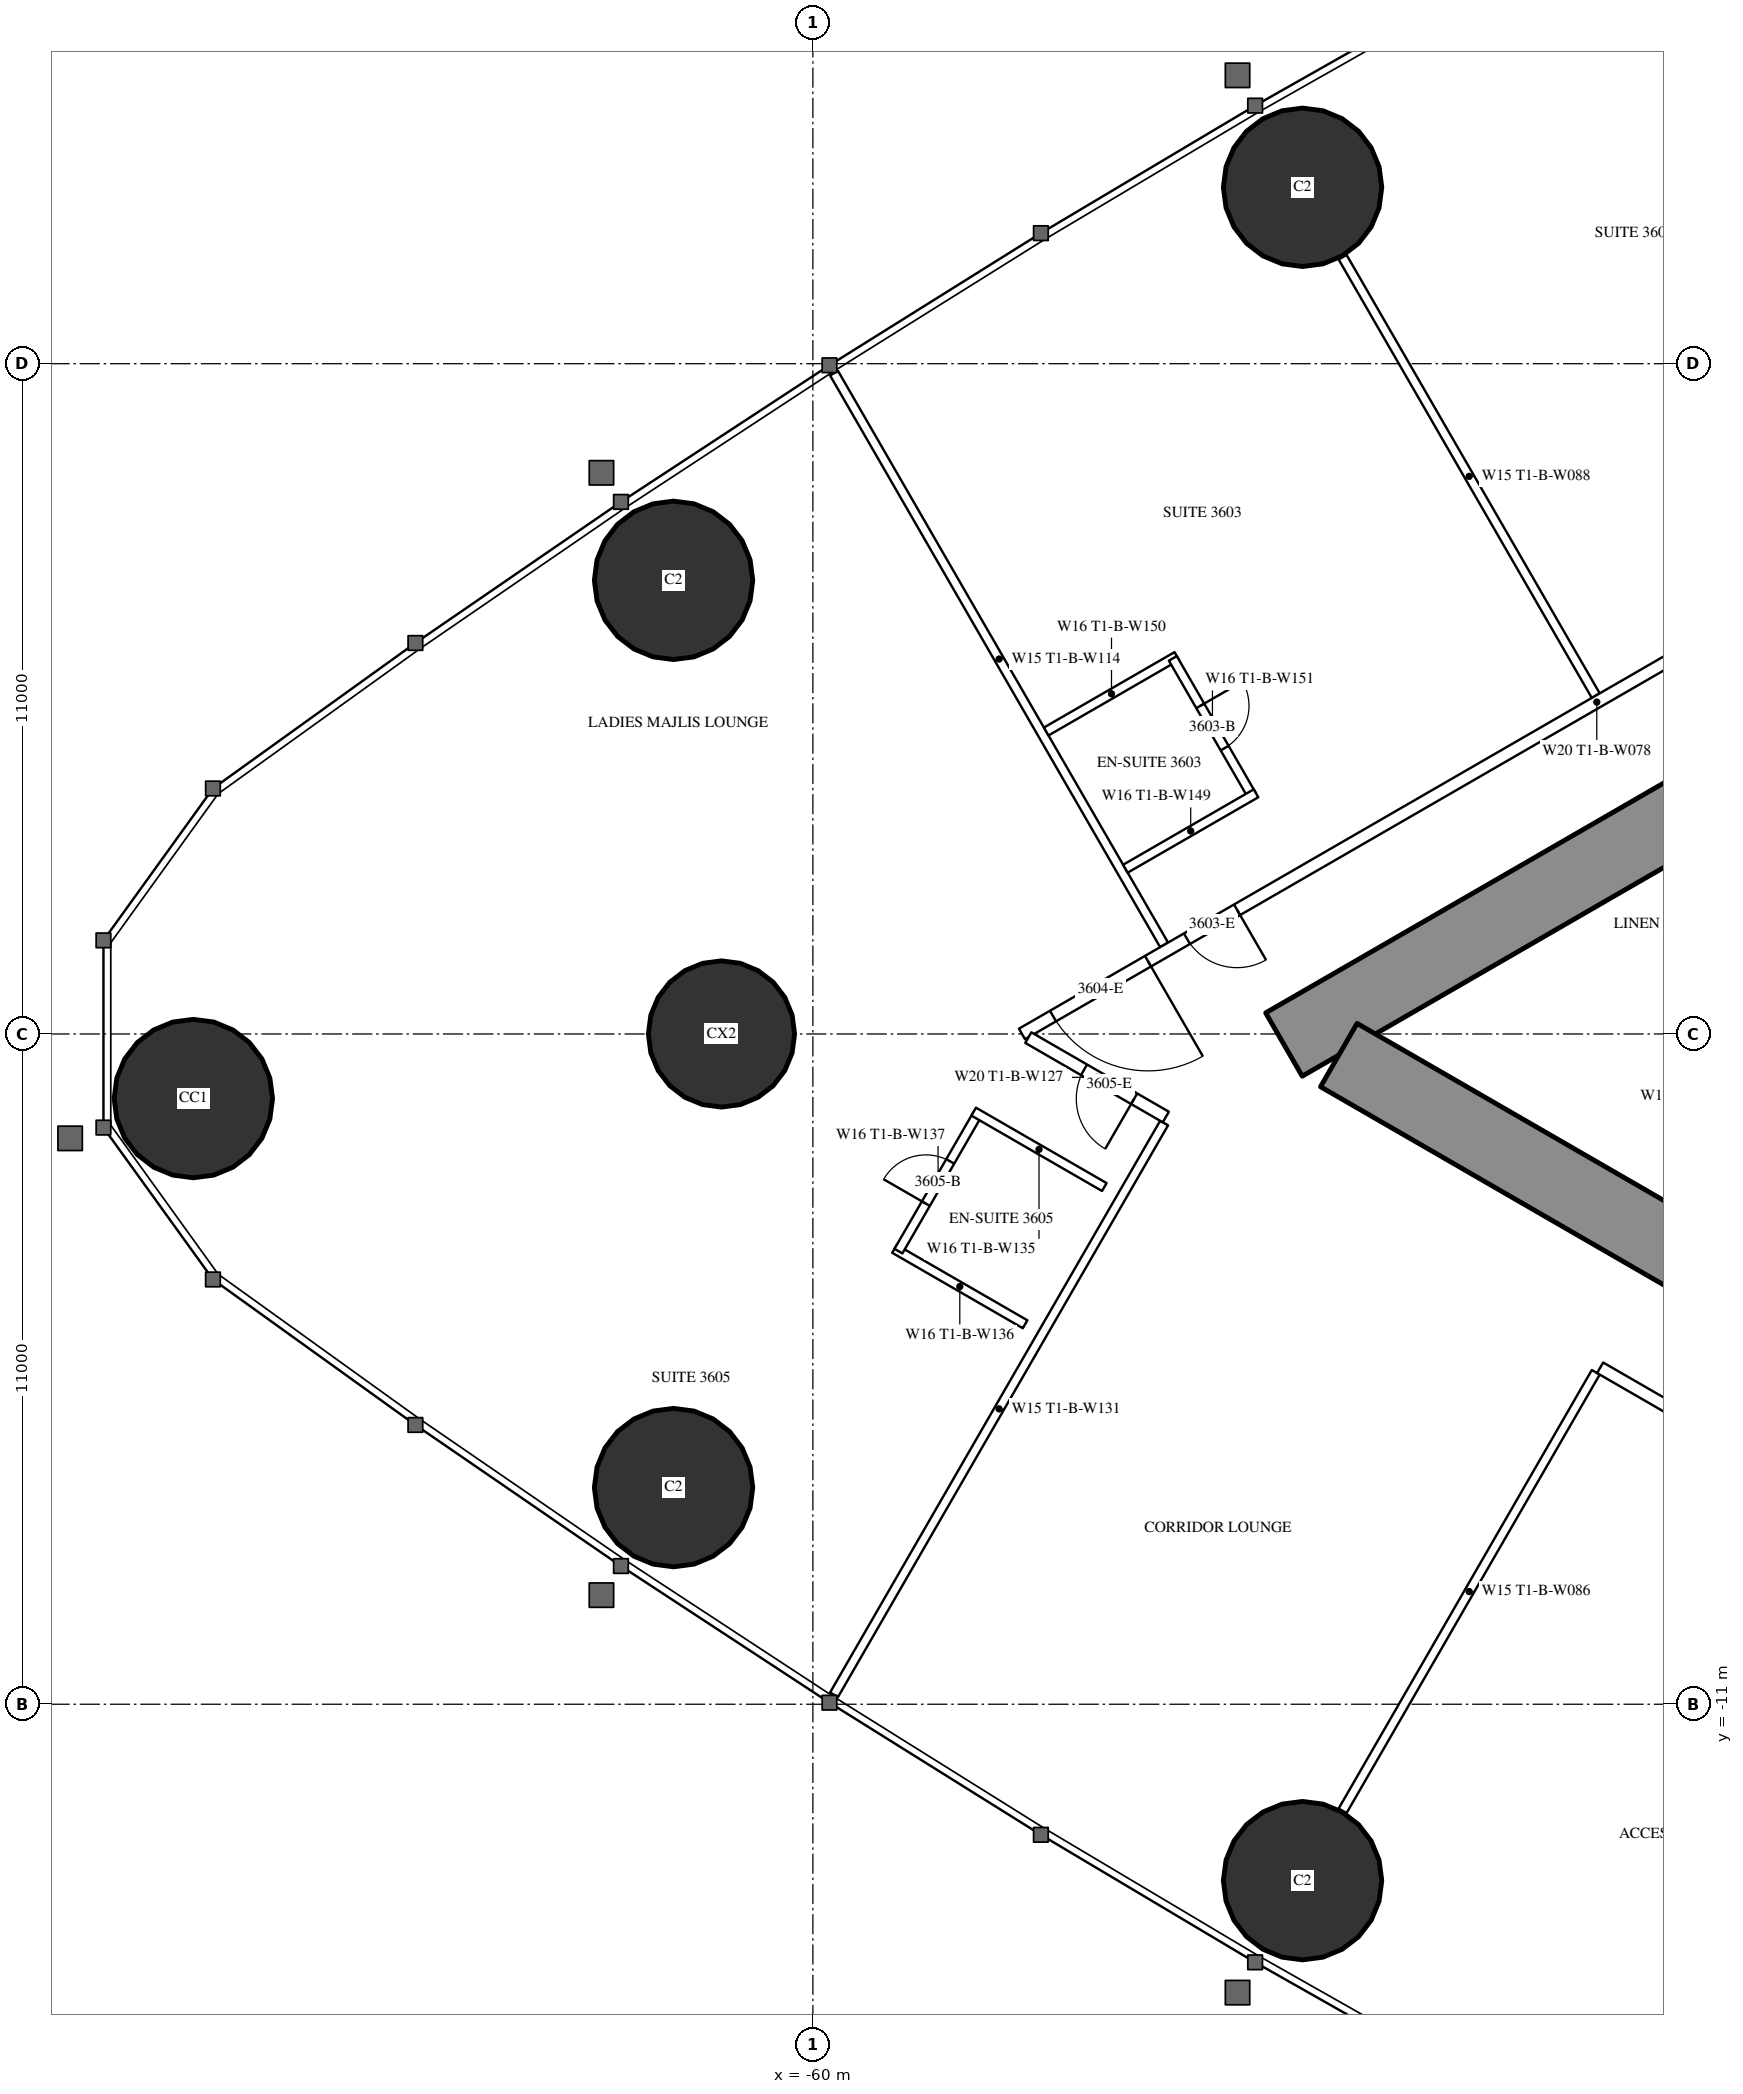
"""IFC4 building model, lengths in metres.
Left out: names, types, materials, properties, quantities, classifications, styles, units other than length and angle.
Written with IfcOpenShell. Run it as: python <this file> out.ifc"""

import sys

from ifc_helpers import new_model, si_unit, direction, frame, frame_2d, origin, origin_2d, place, context, subcontext, project, spatial, rectangle, circle, hollow_circle, extrude, element, fill, save


model = new_model("IFC4")
c1 = context("Model", 3, precision=1e-05, world=origin(), true_north=direction((0.0, 1.0)))
c2 = subcontext(c1, "Body", "Model", "MODEL_VIEW")
j1 = project(units=[si_unit("LENGTHUNIT", "METRE"), si_unit("PLANEANGLEUNIT", "RADIAN")], contexts=[c1])
p1 = place(None, origin())
s1 = spatial("IfcSite", under=j1, at=p1, CompositionType="ELEMENT")
p2 = place(p1, origin())
s2 = spatial("IfcBuilding", under=s1, at=p2, CompositionType="ELEMENT")
p3 = place(p2, frame((0.0, 0.0, 136.1)))
s3 = spatial("IfcBuildingStorey", under=s2, at=p3, CompositionType="ELEMENT", Elevation=136.1)
for number, where, z_axis, x_axis in (
    (1, (-70.168, -1.06, 0.0), (0.0, 0.0, 1.0), (1.0, 0.0, 0.0)),
    (2, (-62.287, -7.445, 0.0), (0.0, 0.0, 1.0), (1.0, 0.0, 0.0)),
    (3, (-51.963, -13.895, 0.0), (0.0, 0.0, 1.0), (1.0, 0.0, 0.0)),
    (4, (-51.963, 13.895, 0.0), (0.0, 0.0, 1.0), (1.0, 0.0, 0.0)),
    (5, (-62.287, 7.445, 0.0), (0.0, 0.0, 1.0), (1.0, 0.0, 0.0)),
):
    element("IfcColumn", number, at=place(p3, frame(where, z_axis=z_axis, x_axis=x_axis)), inside=s3, PredefinedType="COLUMN", context=c2, shape_type="SweptSolid", body=[
        extrude(hollow_circle(Radius=1.3, WallThickness=0.1, at=origin_2d()), origin(), (0.0, 0.0, 1.0), 3.5),
    ])
p4 = place(p3, frame((-61.5, 0.0, 0.0), z_axis=(0.0, 0.0, 1.0), x_axis=(1.0, 0.0, 0.0)))
e6 = element("IfcColumn", 6, at=p4, inside=s3, PredefinedType="COLUMN", context=c2, shape_type="SweptSolid", body=[
    extrude(circle(Radius=1.2, at=origin_2d()), origin(), (0.0, 0.0, 1.0), 3.5),
])
p5 = place(p3, frame((-27.2, 14.3, 0.0), z_axis=(0.0, 0.0, 1.0), x_axis=(-0.866026593062, -0.499997940104, 0.0)))
e7 = element("IfcWall", 7, at=p5, inside=s3, PredefinedType="SHEAR", context=c2, shape_type="SweptSolid", body=[
    extrude(rectangle(XDim=28.946, YDim=1.2, at=frame_2d((14.473, 0.0))), origin(), (0.0, 0.0, 1.0), 3.5),
])
p6 = place(p5, frame((4.6, 0.0, 0.0)))
e8 = element("IfcOpeningElement", 8, at=p6, cuts=e7, PredefinedType="OPENING", context=c2, shape_type="SweptSolid", body=[
    extrude(rectangle(XDim=1.0, YDim=2.2, at=frame_2d((0.5, 1.1))), frame((0.0, 0.61, 0.0), z_axis=(0.0, -1.0, 0.0), x_axis=(1.0, 0.0, 0.0)), (0.0, 0.0, 1.0), 1.22),
])
p7 = place(p5, frame((13.395, 0.0, 0.0)))
e9 = element("IfcOpeningElement", 9, at=p7, cuts=e7, PredefinedType="OPENING", context=c2, shape_type="SweptSolid", body=[
    extrude(rectangle(XDim=1.8, YDim=2.2, at=frame_2d((0.9, 1.1))), frame((0.0, 0.61, 0.0), z_axis=(0.0, -1.0, 0.0), x_axis=(1.0, 0.0, 0.0)), (0.0, 0.0, 1.0), 1.22),
])
p8 = place(p3, frame((-27.2, -14.3, 0.0), z_axis=(0.0, 0.0, 1.0), x_axis=(-0.866024021859, 0.500002393557, 0.0)))
e10 = element("IfcWall", 10, at=p8, inside=s3, PredefinedType="SHEAR", context=c2, shape_type="SweptSolid", body=[
    extrude(rectangle(XDim=27.907, YDim=1.2, at=frame_2d((13.954, 0.0))), origin(), (0.0, 0.0, 1.0), 3.5),
])
p9 = place(p8, frame((4.6, 0.0, 0.0)))
e11 = element("IfcOpeningElement", 11, at=p9, cuts=e10, PredefinedType="OPENING", context=c2, shape_type="SweptSolid", body=[
    extrude(rectangle(XDim=1.0, YDim=2.2, at=frame_2d((0.5, 1.1))), frame((0.0, 0.61, 0.0), z_axis=(0.0, -1.0, 0.0), x_axis=(1.0, 0.0, 0.0)), (0.0, 0.0, 1.0), 1.22),
])
p10 = place(p8, frame((13.395, 0.0, 0.0)))
e12 = element("IfcOpeningElement", 12, at=p10, cuts=e10, PredefinedType="OPENING", context=c2, shape_type="SweptSolid", body=[
    extrude(rectangle(XDim=1.8, YDim=2.2, at=frame_2d((0.9, 1.1))), frame((0.0, 0.61, 0.0), z_axis=(0.0, -1.0, 0.0), x_axis=(1.0, 0.0, 0.0)), (0.0, 0.0, 1.0), 1.22),
])
p11 = place(p3, frame((-47.151, 5.552, 0.0), z_axis=(0.0, 0.0, 1.0), x_axis=(-0.500003012045, 0.866023664773, 0.0)))
e13 = element("IfcWall", 13, at=p11, inside=s3, PredefinedType="PARTITIONING", context=c2, shape_type="SweptSolid", body=[
    extrude(rectangle(XDim=8.311, YDim=0.15, at=frame_2d((4.156, 0.0))), origin(), (0.0, 0.0, 1.0), 2.2),
])
p12 = place(p3, frame((-54.236, 1.462, 0.0), z_axis=(0.0, 0.0, 1.0), x_axis=(-0.499990351854, 0.866030974073, 0.0)))
e14 = element("IfcWall", 14, at=p12, inside=s3, PredefinedType="PARTITIONING", context=c2, shape_type="SweptSolid", body=[
    extrude(rectangle(XDim=10.834, YDim=0.15, at=frame_2d((5.417, 0.0))), origin(), (0.0, 0.0, 1.0), 3.25),
])
p13 = place(p3, frame((-47.151, -5.552, 0.0), z_axis=(0.0, 0.0, 1.0), x_axis=(-0.500003012045, -0.866023664773, 0.0)))
e15 = element("IfcWall", 15, at=p13, inside=s3, PredefinedType="PARTITIONING", context=c2, shape_type="SweptSolid", body=[
    extrude(rectangle(XDim=8.311, YDim=0.15, at=frame_2d((4.156, 0.0))), origin(), (0.0, 0.0, 1.0), 2.2),
])
p14 = place(p3, frame((-54.236, -1.462, 0.0), z_axis=(0.0, 0.0, 1.0), x_axis=(-0.499990351854, -0.866030974073, 0.0)))
e16 = element("IfcWall", 16, at=p14, inside=s3, PredefinedType="PARTITIONING", context=c2, shape_type="SweptSolid", body=[
    extrude(rectangle(XDim=10.834, YDim=0.15, at=frame_2d((5.417, 0.0))), origin(), (0.0, 0.0, 1.0), 3.25),
])
p15 = place(p3, frame((-37.7, 10.894, 0.0), z_axis=(0.0, 0.0, 1.0), x_axis=(-0.866027905338, -0.499995667157, 0.0)))
e17 = element("IfcWall", 17, at=p15, inside=s3, PredefinedType="PARTITIONING", context=c2, shape_type="SweptSolid", body=[
    extrude(rectangle(XDim=21.787, YDim=0.2, at=frame_2d((10.894, 0.0))), origin(), (0.0, 0.0, 1.0), 3.25),
])
p16 = place(p15, frame((17.711, 0.0, 0.0)))
e18 = element("IfcOpeningElement", 18, at=p16, cuts=e17, PredefinedType="OPENING", context=c2, shape_type="SweptSolid", body=[
    extrude(rectangle(XDim=0.95, YDim=2.2, at=frame_2d((0.475, 1.1))), frame((0.0, 0.11, 0.0), z_axis=(0.0, -1.0, 0.0), x_axis=(1.0, 0.0, 0.0)), (0.0, 0.0, 1.0), 0.22),
])
p17 = place(p15, frame((19.399, 0.0, 0.0)))
e19 = element("IfcOpeningElement", 19, at=p17, cuts=e17, PredefinedType="OPENING", context=c2, shape_type="SweptSolid", body=[
    extrude(rectangle(XDim=1.8, YDim=2.2, at=frame_2d((0.9, 1.1))), frame((0.0, 0.11, 0.0), z_axis=(0.0, -1.0, 0.0), x_axis=(1.0, 0.0, 0.0)), (0.0, 0.0, 1.0), 0.22),
])
p18 = place(p15, frame((0.6, 0.0, 0.0)))
e20 = element("IfcOpeningElement", 20, at=p18, cuts=e17, PredefinedType="OPENING", context=c2, shape_type="SweptSolid", body=[
    extrude(rectangle(XDim=0.95, YDim=2.2, at=frame_2d((0.475, 1.1))), frame((0.0, 0.11, 0.0), z_axis=(0.0, -1.0, 0.0), x_axis=(1.0, 0.0, 0.0)), (0.0, 0.0, 1.0), 0.22),
])
p19 = place(p3, frame((-36.92, -11.344, 0.0), z_axis=(0.0, 0.0, 1.0), x_axis=(-0.866027897759, 0.499995680284, 0.0)))
e21 = element("IfcWall", 21, at=p19, inside=s3, PredefinedType="PARTITIONING", context=c2, shape_type="SweptSolid", body=[
    extrude(rectangle(XDim=11.731, YDim=0.2, at=frame_2d((5.865, 0.0))), origin(), (0.0, 0.0, 1.0), 3.25),
])
p20 = place(p19, frame((3.35, 0.0, 0.0)))
e22 = element("IfcOpeningElement", 22, at=p20, cuts=e21, PredefinedType="OPENING", context=c2, shape_type="SweptSolid", body=[
    extrude(rectangle(XDim=1.0, YDim=2.2, at=frame_2d((0.5, 1.1))), frame((0.0, 0.11, 0.0), z_axis=(0.0, -1.0, 0.0), x_axis=(1.0, 0.0, 0.0)), (0.0, 0.0, 1.0), 0.22),
])
p21 = place(p3, frame((-54.207, -1.363, 0.0), z_axis=(0.0, 0.0, 1.0), x_axis=(-0.866049872286, 0.499957616916, 0.0)))
e23 = element("IfcWall", 23, at=p21, inside=s3, PredefinedType="PARTITIONING", context=c2, shape_type="SweptSolid", body=[
    extrude(rectangle(XDim=2.606, YDim=0.2, at=frame_2d((1.303, 0.0))), origin(), (0.0, 0.0, 1.0), 3.25),
])
p22 = place(p21, frame((0.6, 0.0, 0.0)))
e24 = element("IfcOpeningElement", 24, at=p22, cuts=e23, PredefinedType="OPENING", context=c2, shape_type="SweptSolid", body=[
    extrude(rectangle(XDim=0.95, YDim=2.2, at=frame_2d((0.475, 1.1))), frame((0.0, 0.11, 0.0), z_axis=(0.0, -1.0, 0.0), x_axis=(1.0, 0.0, 0.0)), (0.0, 0.0, 1.0), 0.22),
])
p23 = place(p3, frame((-54.027, 6.201, 0.0), z_axis=(0.0, 0.0, 1.0), x_axis=(-0.866006523861, -0.500032699561, 0.0)))
e25 = element("IfcWall", 25, at=p23, inside=s3, PredefinedType="PARTITIONING", context=c2, shape_type="SweptSolid", body=[
    extrude(rectangle(XDim=2.475, YDim=0.15, at=frame_2d((1.237, 0.0))), origin(), (0.0, 0.0, 1.0), 3.25),
])
p24 = place(p3, frame((-52.792, 3.912, 0.0), z_axis=(0.0, 0.0, 1.0), x_axis=(-0.500006934395, 0.866021400173, 0.0)))
e26 = element("IfcWall", 26, at=p24, inside=s3, PredefinedType="PARTITIONING", context=c2, shape_type="SweptSolid", body=[
    extrude(rectangle(XDim=2.6, YDim=0.15, at=frame_2d((1.3, 0.0))), origin(), (0.0, 0.0, 1.0), 3.25),
])
p25 = place(p24, frame((0.9, 0.0, 0.0)))
e27 = element("IfcOpeningElement", 27, at=p25, cuts=e26, PredefinedType="OPENING", context=c2, shape_type="SweptSolid", body=[
    extrude(rectangle(XDim=0.8, YDim=2.2, at=frame_2d((0.4, 1.1))), frame((0.0, 0.085, 0.0), z_axis=(0.0, -1.0, 0.0), x_axis=(1.0, 0.0, 0.0)), (0.0, 0.0, 1.0), 0.17),
])
p26 = place(p3, frame((-52.727, 3.95, 0.0), z_axis=(0.0, 0.0, 1.0), x_axis=(-0.866006523861, -0.500032699561, 0.0)))
e28 = element("IfcWall", 28, at=p26, inside=s3, PredefinedType="PARTITIONING", context=c2, shape_type="SweptSolid", body=[
    extrude(rectangle(XDim=2.475, YDim=0.15, at=frame_2d((1.237, 0.0))), origin(), (0.0, 0.0, 1.0), 3.25),
])
p27 = place(p3, frame((-56.517, -4.764, 0.0), z_axis=(0.0, 0.0, 1.0), x_axis=(-0.866031185235, 0.4999899861, 0.0)))
e29 = element("IfcWall", 29, at=p27, inside=s3, PredefinedType="PARTITIONING", context=c2, shape_type="SweptSolid", body=[
    extrude(rectangle(XDim=2.475, YDim=0.15, at=frame_2d((1.238, 0.0))), origin(), (0.0, 0.0, 1.0), 3.25),
])
p28 = place(p3, frame((-57.296, -1.312, 0.0), z_axis=(0.0, 0.0, 1.0), x_axis=(-0.49997716683, -0.86603858612, 0.0)))
e30 = element("IfcWall", 30, at=p28, inside=s3, PredefinedType="PARTITIONING", context=c2, shape_type="SweptSolid", body=[
    extrude(rectangle(XDim=2.6, YDim=0.15, at=frame_2d((1.3, 0.0))), origin(), (0.0, 0.0, 1.0), 3.25),
])
p29 = place(p28, frame((0.9, 0.0, 0.0)))
e31 = element("IfcOpeningElement", 31, at=p29, cuts=e30, PredefinedType="OPENING", context=c2, shape_type="SweptSolid", body=[
    extrude(rectangle(XDim=0.8, YDim=2.2, at=frame_2d((0.4, 1.1))), frame((0.0, 0.085, 0.0), z_axis=(0.0, -1.0, 0.0), x_axis=(1.0, 0.0, 0.0)), (0.0, 0.0, 1.0), 0.17),
])
p30 = place(p3, frame((-55.217, -2.512, 0.0), z_axis=(0.0, 0.0, 1.0), x_axis=(-0.866031185235, 0.4999899861, 0.0)))
e32 = element("IfcWall", 32, at=p30, inside=s3, PredefinedType="PARTITIONING", context=c2, shape_type="SweptSolid", body=[
    extrude(rectangle(XDim=2.475, YDim=0.15, at=frame_2d((1.238, 0.0))), origin(), (0.0, 0.0, 1.0), 3.25),
])
p31 = place(p25, origin())
e33 = element("IfcDoor", 33, at=p31, inside=s3, OperationType="SINGLE_SWING_RIGHT", PredefinedType="DOOR", context=c2, shape_type="SweptSolid", body=[
    extrude(rectangle(XDim=0.8, YDim=2.2, at=frame_2d((0.4, 1.1))), frame((0.0, 0.025, 0.0), z_axis=(0.0, -1.0, 0.0), x_axis=(1.0, 0.0, 0.0)), (0.0, 0.0, 1.0), 0.05),
])
fill(e27, e33)
p32 = place(p16, origin())
e34 = element("IfcDoor", 34, at=p32, inside=s3, OperationType="SINGLE_SWING_LEFT", PredefinedType="DOOR", context=c2, shape_type="SweptSolid", body=[
    extrude(rectangle(XDim=0.95, YDim=2.2, at=frame_2d((0.475, 1.1))), frame((0.0, 0.025, 0.0), z_axis=(0.0, -1.0, 0.0), x_axis=(1.0, 0.0, 0.0)), (0.0, 0.0, 1.0), 0.05),
])
fill(e18, e34)
p33 = place(p17, origin())
e35 = element("IfcDoor", 35, at=p33, inside=s3, OperationType="DOUBLE_DOOR_SINGLE_SWING", PredefinedType="DOOR", context=c2, shape_type="SweptSolid", body=[
    extrude(rectangle(XDim=1.8, YDim=2.2, at=frame_2d((0.9, 1.1))), frame((0.0, 0.025, 0.0), z_axis=(0.0, -1.0, 0.0), x_axis=(1.0, 0.0, 0.0)), (0.0, 0.0, 1.0), 0.05),
])
fill(e19, e35)
p34 = place(p29, origin())
e36 = element("IfcDoor", 36, at=p34, inside=s3, OperationType="SINGLE_SWING_RIGHT", PredefinedType="DOOR", context=c2, shape_type="SweptSolid", body=[
    extrude(rectangle(XDim=0.8, YDim=2.2, at=frame_2d((0.4, 1.1))), frame((0.0, 0.025, 0.0), z_axis=(0.0, -1.0, 0.0), x_axis=(1.0, 0.0, 0.0)), (0.0, 0.0, 1.0), 0.05),
])
fill(e31, e36)
p35 = place(p22, origin())
e37 = element("IfcDoor", 37, at=p35, inside=s3, OperationType="SINGLE_SWING_LEFT", PredefinedType="DOOR", context=c2, shape_type="SweptSolid", body=[
    extrude(rectangle(XDim=0.95, YDim=2.2, at=frame_2d((0.475, 1.1))), frame((0.0, 0.025, 0.0), z_axis=(0.0, -1.0, 0.0), x_axis=(1.0, 0.0, 0.0)), (0.0, 0.0, 1.0), 0.05),
])
fill(e24, e37)
save(model, sys.argv[1])
